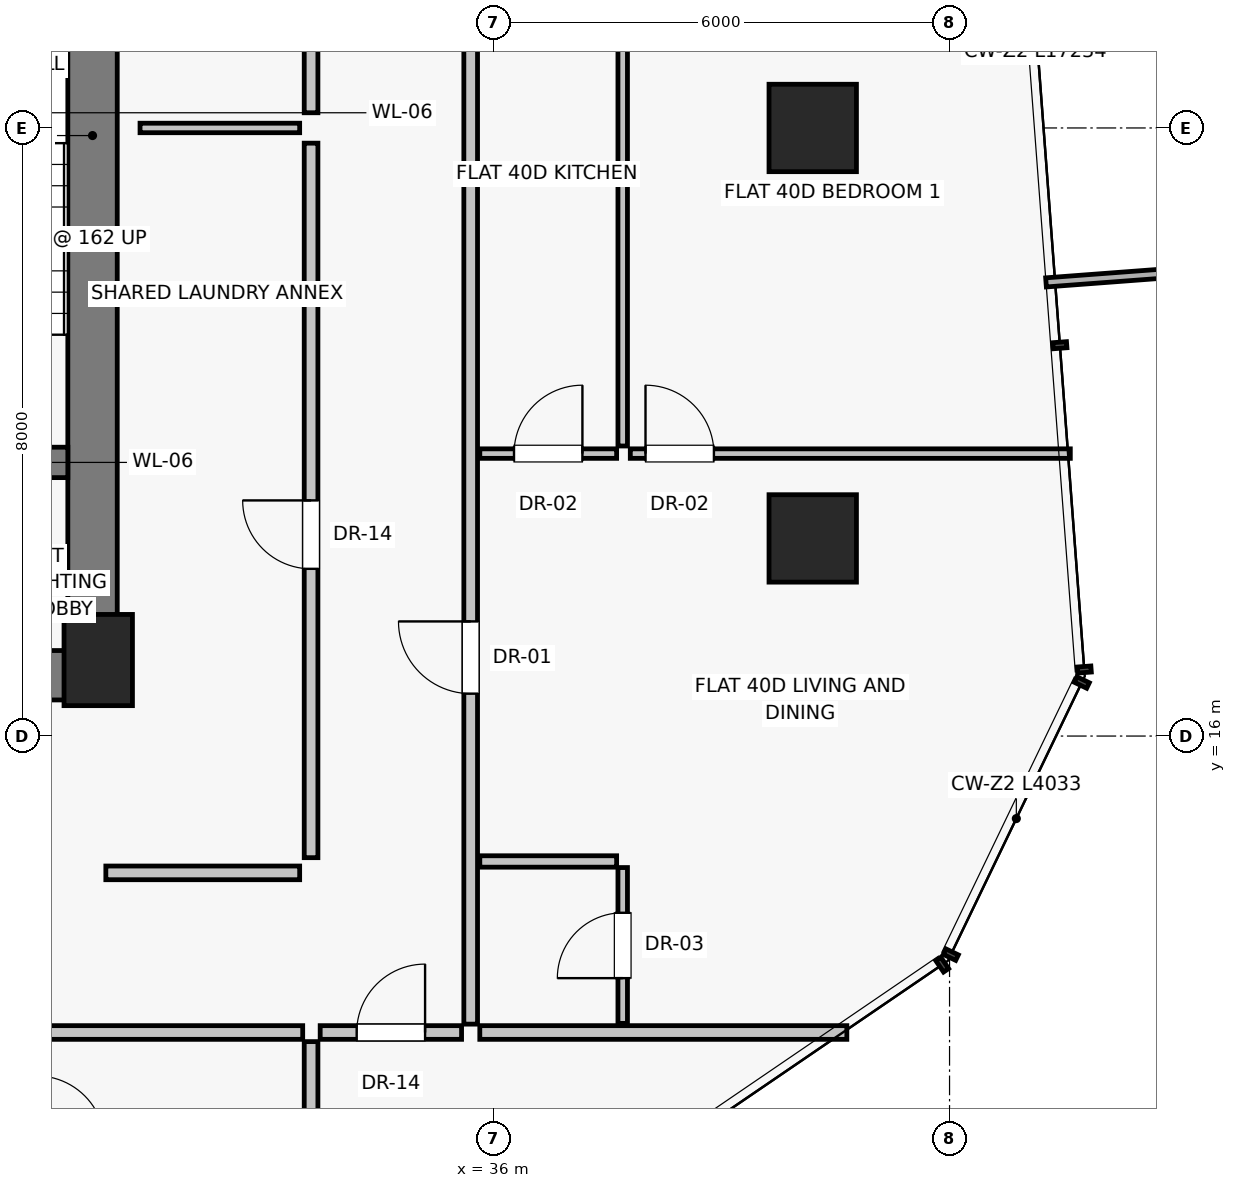
"""IFC4 building model, lengths in metres.
Left out: names, types, materials, properties, quantities, classifications, styles, units other than length and angle.
Written with IfcOpenShell. Run it as: python <this file> out.ifc"""

import sys

from ifc_helpers import new_model, si_unit, direction, frame, frame_2d, origin, origin_2d, place, context, subcontext, project, spatial, rectangle, extrude, source, transform, mapped, element, fill, save


model = new_model("IFC4")
c1 = context("Model", 3, precision=1e-05, world=origin(), true_north=direction((0.0, 1.0)))
c2 = subcontext(c1, "Body", "Model", "MODEL_VIEW")
j1 = project(units=[si_unit("LENGTHUNIT", "METRE"), si_unit("PLANEANGLEUNIT", "RADIAN")], contexts=[c1])
p1 = place(None, origin())
s1 = spatial("IfcSite", under=j1, at=p1, CompositionType="ELEMENT")
p2 = place(p1, origin())
s2 = spatial("IfcBuilding", under=s1, at=p2, CompositionType="ELEMENT")
p3 = place(p2, frame((0.0, 0.0, 142.5)))
s3 = spatial("IfcBuildingStorey", under=s2, at=p3, CompositionType="ELEMENT", Elevation=142.5)
p4 = place(p3, frame((30.8, 17.0, 0.0), z_axis=(0.0, 0.0, 1.0), x_axis=(1.0, 0.0, 0.0)))
e1 = element("IfcColumn", 1, at=p4, inside=s3, PredefinedType="PILASTER", context=c2, shape_type="SweptSolid", body=[
    extrude(rectangle(XDim=0.9, YDim=1.2, at=origin_2d()), origin(), (0.0, 0.0, 1.0), 3.25),
])
for number, where, z_axis, x_axis in (
    (2, (40.2, 18.6, 0.0), (0.0, 0.0, 1.0), (1.0, 0.0, 0.0)),
    (3, (40.2, 24.0, 0.0), (0.0, 0.0, 1.0), (1.0, 0.0, 0.0)),
):
    element("IfcColumn", number, at=place(p3, frame(where, z_axis=z_axis, x_axis=x_axis)), inside=s3, PredefinedType="COLUMN", context=c2, shape_type="SweptSolid", body=[
        extrude(rectangle(XDim=1.15, YDim=1.15, at=origin_2d()), origin(), (0.0, 0.0, 1.0), 3.25),
    ])
p5 = place(p3, frame((30.725, 16.8, 0.0), z_axis=(0.0, 0.0, 1.0), x_axis=(0.0, 1.0, 0.0)))
e4 = element("IfcWall", 4, at=p5, inside=s3, PredefinedType="SHEAR", context=c2, shape_type="SweptSolid", body=[
    extrude(rectangle(XDim=14.2, YDim=0.65, at=frame_2d((7.1, 0.0))), origin(), (0.0, 0.0, 1.0), 3.0),
])
p6 = place(p3, frame((24.95, 16.8, 0.0), z_axis=(0.0, 0.0, 1.0), x_axis=(1.0, 0.0, 0.0)))
e5 = element("IfcWall", 5, at=p6, inside=s3, PredefinedType="SHEAR", context=c2, shape_type="SweptSolid", body=[
    extrude(rectangle(XDim=5.85, YDim=0.65, at=frame_2d((2.925, 0.0))), origin(), (0.0, 0.0, 1.0), 3.0),
])
p7 = place(p6, frame((2.15, 0.0, 0.0)))
e6 = element("IfcOpeningElement", 6, at=p7, cuts=e5, PredefinedType="OPENING", context=c2, shape_type="SweptSolid", body=[
    extrude(rectangle(XDim=1.2, YDim=2.03, at=frame_2d((0.6, 1.015))), frame((0.0, 0.335, 0.0), z_axis=(0.0, -1.0, 0.0), x_axis=(1.0, 0.0, 0.0)), (0.0, 0.0, 1.0), 0.67),
])
p8 = place(p3, frame((27.0, 19.6, 0.0), z_axis=(0.0, 0.0, 1.0), x_axis=(1.0, 0.0, 0.0)))
e7 = element("IfcWall", 7, at=p8, inside=s3, PredefinedType="SHEAR", context=c2, shape_type="SweptSolid", body=[
    extrude(rectangle(XDim=3.4, YDim=0.4, at=frame_2d((1.7, 0.0))), origin(), (0.0, 0.0, 1.0), 3.0),
])
p9 = place(p8, frame((1.05, 0.0, 0.0)))
e8 = element("IfcOpeningElement", 8, at=p9, cuts=e7, PredefinedType="OPENING", context=c2, shape_type="SweptSolid", body=[
    extrude(rectangle(XDim=1.1, YDim=2.03, at=frame_2d((0.55, 1.015))), frame((0.0, 0.21, 0.0), z_axis=(0.0, -1.0, 0.0), x_axis=(1.0, 0.0, 0.0)), (0.0, 0.0, 1.0), 0.42),
])
p10 = place(p3, frame((33.6, 14.4, 0.0), z_axis=(0.0, 0.0, 1.0), x_axis=(0.0, 1.0, 0.0)))
e9 = element("IfcWall", 9, at=p10, inside=s3, PredefinedType="PARTITIONING", context=c2, shape_type="SweptSolid", body=[
    extrude(rectangle(XDim=9.4, YDim=0.18, at=frame_2d((4.7, 0.0))), origin(), (0.0, 0.0, 1.0), 3.0),
])
p11 = place(p10, frame((3.8, 0.0, 0.0)))
e10 = element("IfcOpeningElement", 10, at=p11, cuts=e9, PredefinedType="OPENING", context=c2, shape_type="SweptSolid", body=[
    extrude(rectangle(XDim=0.9, YDim=2.01, at=frame_2d((0.45, 1.005))), frame((0.0, 0.1, 0.0), z_axis=(0.0, -1.0, 0.0), x_axis=(1.0, 0.0, 0.0)), (0.0, 0.0, 1.0), 0.2),
])
p12 = place(p3, frame((33.6, 24.2, 0.0), z_axis=(0.0, 0.0, 1.0), x_axis=(0.0, 1.0, 0.0)))
e11 = element("IfcWall", 11, at=p12, inside=s3, PredefinedType="PARTITIONING", context=c2, shape_type="SweptSolid", body=[
    extrude(rectangle(XDim=9.2, YDim=0.18, at=frame_2d((4.6, 0.0))), origin(), (0.0, 0.0, 1.0), 3.0),
])
p13 = place(p12, frame((3.8, 0.0, 0.0)))
e12 = element("IfcOpeningElement", 12, at=p13, cuts=e11, PredefinedType="OPENING", context=c2, shape_type="SweptSolid", body=[
    extrude(rectangle(XDim=0.9, YDim=2.01, at=frame_2d((0.45, 1.005))), frame((0.0, 0.1, 0.0), z_axis=(0.0, -1.0, 0.0), x_axis=(1.0, 0.0, 0.0)), (0.0, 0.0, 1.0), 0.2),
])
p14 = place(p3, frame((31.35, 24.0, 0.0), z_axis=(0.0, 0.0, 1.0), x_axis=(1.0, 0.0, 0.0)))
e13 = element("IfcWall", 13, at=p14, inside=s3, PredefinedType="PARTITIONING", context=c2, shape_type="SweptSolid", body=[
    extrude(rectangle(XDim=2.1, YDim=0.125, at=frame_2d((1.05, 0.0))), origin(), (0.0, 0.0, 1.0), 3.0),
])
p15 = place(p3, frame((30.9, 14.2, 0.0), z_axis=(0.0, 0.0, 1.0), x_axis=(1.0, 0.0, 0.0)))
e14 = element("IfcWall", 14, at=p15, inside=s3, PredefinedType="PARTITIONING", context=c2, shape_type="SweptSolid", body=[
    extrude(rectangle(XDim=2.55, YDim=0.18, at=frame_2d((1.275, 0.0))), origin(), (0.0, 0.0, 1.0), 3.0),
])
p16 = place(p3, frame((33.6, 11.98, 0.0), z_axis=(0.0, 0.0, 1.0), x_axis=(0.0, -1.0, 0.0)))
e15 = element("IfcWall", 15, at=p16, inside=s3, PredefinedType="PARTITIONING", context=c2, shape_type="SweptSolid", body=[
    extrude(rectangle(XDim=4.688, YDim=0.18, at=frame_2d((2.344, 0.0))), origin(), (0.0, 0.0, 1.0), 3.0),
])
p17 = place(p3, frame((25.854, 12.1, 0.0), z_axis=(0.0, 0.0, 1.0), x_axis=(1.0, 0.0, 0.0)))
e16 = element("IfcWall", 16, at=p17, inside=s3, PredefinedType="PARTITIONING", context=c2, shape_type="SweptSolid", body=[
    extrude(rectangle(XDim=7.636, YDim=0.18, at=frame_2d((3.818, 0.0))), origin(), (0.0, 0.0, 1.0), 2.58),
])
p18 = place(p17, frame((2.661, 0.0, 0.0)))
e17 = element("IfcOpeningElement", 17, at=p18, cuts=e16, PredefinedType="OPENING", context=c2, shape_type="SweptSolid", body=[
    extrude(rectangle(XDim=0.95, YDim=2.02, at=frame_2d((0.475, 1.01))), frame((0.0, 0.1, 0.0), z_axis=(0.0, -1.0, 0.0), x_axis=(1.0, 0.0, 0.0)), (0.0, 0.0, 1.0), 0.2),
])
p19 = place(p3, frame((35.82, 12.1, 0.0), z_axis=(0.0, 0.0, 1.0), x_axis=(1.0, 0.0, 0.0)))
e18 = element("IfcWall", 18, at=p19, inside=s3, PredefinedType="PARTITIONING", context=c2, shape_type="SweptSolid", body=[
    extrude(rectangle(XDim=4.829, YDim=0.18, at=frame_2d((2.414, 0.0))), origin(), (0.0, 0.0, 1.0), 3.0),
])
p20 = place(p3, frame((35.7, 12.21, 0.0), z_axis=(0.0, 0.0, 1.0), x_axis=(0.0, 1.0, 0.0)))
e19 = element("IfcWall", 19, at=p20, inside=s3, PredefinedType="PARTITIONING", context=c2, shape_type="SweptSolid", body=[
    extrude(rectangle(XDim=13.628, YDim=0.18, at=frame_2d((6.814, 0.0))), origin(), (0.0, 0.0, 1.0), 2.58),
])
p21 = place(p20, frame((4.348, 0.0, 0.0)))
e20 = element("IfcOpeningElement", 20, at=p21, cuts=e19, PredefinedType="OPENING", context=c2, shape_type="SweptSolid", body=[
    extrude(rectangle(XDim=0.95, YDim=2.02, at=frame_2d((0.475, 1.01))), frame((0.0, 0.1, 0.0), z_axis=(0.0, -1.0, 0.0), x_axis=(1.0, 0.0, 0.0)), (0.0, 0.0, 1.0), 0.2),
])
p22 = place(p3, frame((35.82, 14.35, 0.0), z_axis=(0.0, 0.0, 1.0), x_axis=(1.0, 0.0, 0.0)))
e21 = element("IfcWall", 21, at=p22, inside=s3, PredefinedType="PARTITIONING", context=c2, shape_type="SweptSolid", body=[
    extrude(rectangle(XDim=1.8, YDim=0.15, at=frame_2d((0.9, 0.0))), origin(), (0.0, 0.0, 1.0), 3.0),
])
p23 = place(p3, frame((37.7, 12.22, 0.0), z_axis=(0.0, 0.0, 1.0), x_axis=(0.0, 1.0, 0.0)))
e22 = element("IfcWall", 22, at=p23, inside=s3, PredefinedType="PARTITIONING", context=c2, shape_type="SweptSolid", body=[
    extrude(rectangle(XDim=2.05, YDim=0.125, at=frame_2d((1.025, 0.0))), origin(), (0.0, 0.0, 1.0), 3.0),
])
p24 = place(p23, frame((0.595, 0.0, 0.0)))
e23 = element("IfcOpeningElement", 23, at=p24, cuts=e22, PredefinedType="OPENING", context=c2, shape_type="SweptSolid", body=[
    extrude(rectangle(XDim=0.86, YDim=2.01, at=frame_2d((0.43, 1.005))), frame((0.0, 0.073, 0.0), z_axis=(0.0, -1.0, 0.0), x_axis=(1.0, 0.0, 0.0)), (0.0, 0.0, 1.0), 0.145),
])
p25 = place(p3, frame((35.82, 19.716, 0.0), z_axis=(0.0, 0.0, 1.0), x_axis=(1.0, 0.0, 0.0)))
e24 = element("IfcWall", 24, at=p25, inside=s3, PredefinedType="PARTITIONING", context=c2, shape_type="SweptSolid", body=[
    extrude(rectangle(XDim=1.8, YDim=0.125, at=frame_2d((0.9, 0.0))), origin(), (0.0, 0.0, 1.0), 3.0),
])
p26 = place(p25, frame((0.45, 0.0, 0.0)))
e25 = element("IfcOpeningElement", 25, at=p26, cuts=e24, PredefinedType="OPENING", context=c2, shape_type="SweptSolid", body=[
    extrude(rectangle(XDim=0.9, YDim=2.01, at=frame_2d((0.45, 1.005))), frame((0.0, 0.073, 0.0), z_axis=(0.0, -1.0, 0.0), x_axis=(1.0, 0.0, 0.0)), (0.0, 0.0, 1.0), 0.145),
])
p27 = place(p3, frame((37.7, 19.816, 0.0), z_axis=(0.0, 0.0, 1.0), x_axis=(0.0, 1.0, 0.0)))
e26 = element("IfcWall", 26, at=p27, inside=s3, PredefinedType="PARTITIONING", context=c2, shape_type="SweptSolid", body=[
    extrude(rectangle(XDim=6.012, YDim=0.125, at=frame_2d((3.006, 0.0))), origin(), (0.0, 0.0, 1.0), 3.0),
])
p28 = place(p3, frame((37.8, 19.716, 0.0), z_axis=(0.0, 0.0, 1.0), x_axis=(1.0, 0.0, 0.0)))
e27 = element("IfcWall", 27, at=p28, inside=s3, PredefinedType="PARTITIONING", context=c2, shape_type="SweptSolid", body=[
    extrude(rectangle(XDim=5.789, YDim=0.125, at=frame_2d((2.895, 0.0))), origin(), (0.0, 0.0, 1.0), 3.0),
])
p29 = place(p28, frame((0.2, 0.0, 0.0)))
e28 = element("IfcOpeningElement", 28, at=p29, cuts=e27, PredefinedType="OPENING", context=c2, shape_type="SweptSolid", body=[
    extrude(rectangle(XDim=0.9, YDim=2.01, at=frame_2d((0.45, 1.005))), frame((0.0, 0.073, 0.0), z_axis=(0.0, -1.0, 0.0), x_axis=(1.0, 0.0, 0.0)), (0.0, 0.0, 1.0), 0.145),
])
p30 = place(p3, frame((33.72, 12.1, 0.0), z_axis=(0.0, 0.0, 1.0), x_axis=(1.0, 0.0, 0.0)))
e29 = element("IfcWall", 29, at=p30, inside=s3, PredefinedType="PARTITIONING", context=c2, shape_type="SweptSolid", body=[
    extrude(rectangle(XDim=1.86, YDim=0.18, at=frame_2d((0.93, 0.0))), origin(), (0.0, 0.0, 1.0), 3.0),
])
p31 = place(p30, frame((0.48, 0.0, 0.0)))
e30 = element("IfcOpeningElement", 30, at=p31, cuts=e29, PredefinedType="OPENING", context=c2, shape_type="SweptSolid", body=[
    extrude(rectangle(XDim=0.9, YDim=2.01, at=frame_2d((0.45, 1.005))), frame((0.0, 0.1, 0.0), z_axis=(0.0, -1.0, 0.0), x_axis=(1.0, 0.0, 0.0)), (0.0, 0.0, 1.0), 0.2),
])
m1 = source(origin(), c2, "Body", "SweptSolid", [
    extrude(rectangle(XDim=0.9, YDim=2.01, at=frame_2d((0.45, 1.005))), frame((0.0, 0.025, 0.0), z_axis=(0.0, -1.0, 0.0), x_axis=(1.0, 0.0, 0.0)), (0.0, 0.0, 1.0), 0.05),
])
p32 = place(p11, origin())
e31 = element("IfcDoor", 31, at=p32, inside=s3, OperationType="SINGLE_SWING_RIGHT", PredefinedType="DOOR", context=c2, shape_type="MappedRepresentation", body=[
    mapped(m1, transform((0.0, 0.0, 0.0), scale=1.0)),
])
fill(e10, e31)
m2 = source(origin(), c2, "Body", "SweptSolid", [
    extrude(rectangle(XDim=0.95, YDim=2.02, at=frame_2d((0.475, 1.01))), frame((0.0, 0.025, 0.0), z_axis=(0.0, -1.0, 0.0), x_axis=(1.0, 0.0, 0.0)), (0.0, 0.0, 1.0), 0.05),
])
p33 = place(p21, origin())
e32 = element("IfcDoor", 32, at=p33, inside=s3, OperationType="SINGLE_SWING_RIGHT", PredefinedType="DOOR", context=c2, shape_type="MappedRepresentation", body=[
    mapped(m2, transform((0.0, 0.0, 0.0), scale=1.0)),
])
fill(e20, e32)
m3 = source(origin(), c2, "Body", "SweptSolid", [
    extrude(rectangle(XDim=0.86, YDim=2.01, at=frame_2d((0.43, 1.005))), frame((0.0, 0.025, 0.0), z_axis=(0.0, -1.0, 0.0), x_axis=(1.0, 0.0, 0.0)), (0.0, 0.0, 1.0), 0.05),
])
p34 = place(p24, origin())
e33 = element("IfcDoor", 33, at=p34, inside=s3, OperationType="SINGLE_SWING_LEFT", PredefinedType="DOOR", context=c2, shape_type="MappedRepresentation", body=[
    mapped(m3, transform((0.0, 0.0, 0.0), scale=1.0)),
])
fill(e23, e33)
p35 = place(p26, origin())
e34 = element("IfcDoor", 34, at=p35, inside=s3, OperationType="SINGLE_SWING_RIGHT", PredefinedType="DOOR", context=c2, shape_type="MappedRepresentation", body=[
    mapped(m1, transform((0.0, 0.0, 0.0), scale=1.0)),
])
fill(e25, e34)
p36 = place(p29, origin())
e35 = element("IfcDoor", 35, at=p36, inside=s3, OperationType="SINGLE_SWING_LEFT", PredefinedType="DOOR", context=c2, shape_type="MappedRepresentation", body=[
    mapped(m1, transform((0.0, 0.0, 0.0), scale=1.0)),
])
fill(e28, e35)
p37 = place(p31, origin())
e36 = element("IfcDoor", 36, at=p37, inside=s3, OperationType="SINGLE_SWING_RIGHT", PredefinedType="DOOR", context=c2, shape_type="MappedRepresentation", body=[
    mapped(m1, transform((0.0, 0.0, 0.0), scale=1.0)),
])
fill(e30, e36)
save(model, sys.argv[1])
